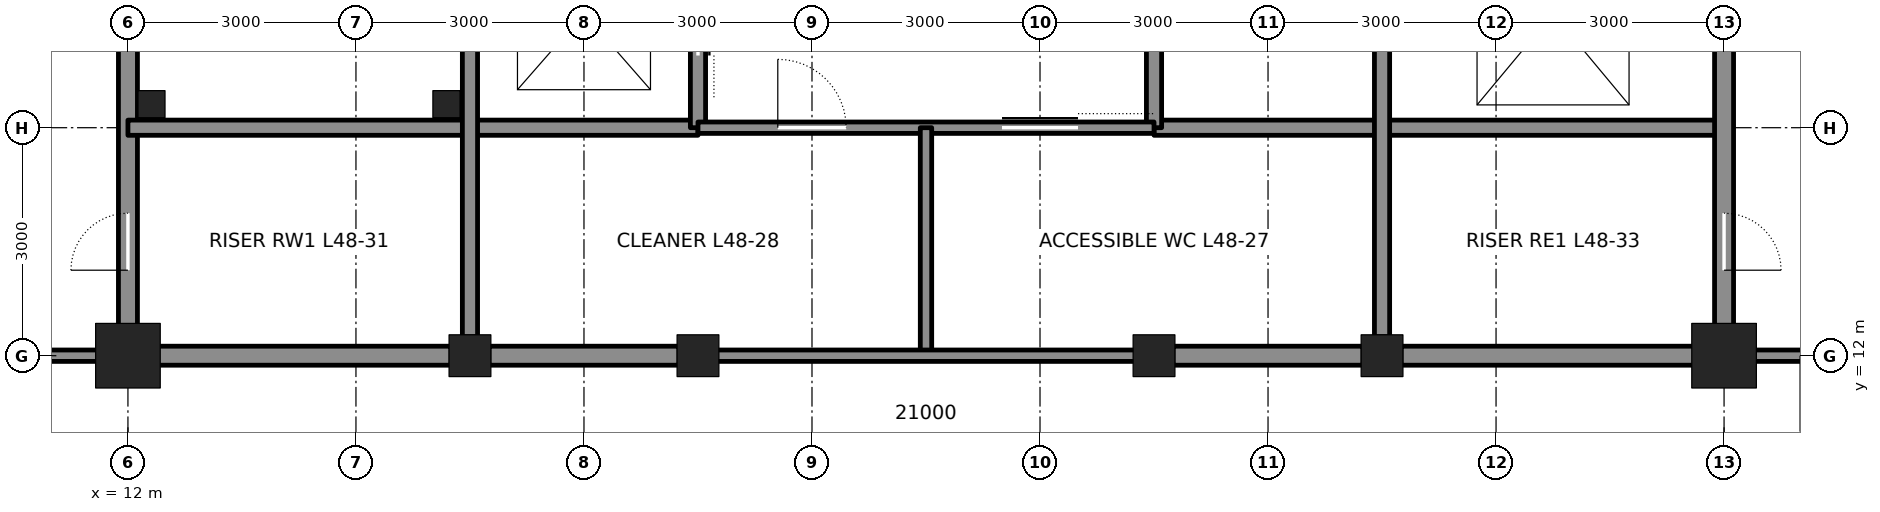
"""IFC4 building model, lengths in metres.
Left out: names, types, materials, properties, quantities, classifications, styles, units other than length and angle.
Written with IfcOpenShell. Run it as: python <this file> out.ifc"""

import sys

from ifc_helpers import new_model, si_unit, direction, frame, frame_2d, origin, origin_2d, place, context, subcontext, project, spatial, rectangle, hollow_rectangle, extrude, element, fill, save


model = new_model("IFC4")
c1 = context("Model", 3, precision=1e-05, world=origin(), true_north=direction((0.0, 1.0)))
c2 = subcontext(c1, "Body", "Model", "MODEL_VIEW")
j1 = project(units=[si_unit("LENGTHUNIT", "METRE"), si_unit("PLANEANGLEUNIT", "RADIAN")], contexts=[c1])
p1 = place(None, origin())
s1 = spatial("IfcSite", under=j1, at=p1, CompositionType="ELEMENT")
p2 = place(p1, origin())
s2 = spatial("IfcBuilding", under=s1, at=p2, CompositionType="ELEMENT")
p3 = place(p2, frame((0.0, 0.0, 218.1)))
s3 = spatial("IfcBuildingStorey", under=s2, at=p3, CompositionType="ELEMENT", Elevation=218.1)
p4 = place(p3, frame((12.0, 12.0, 0.0), z_axis=(0.0, 0.0, 1.0), x_axis=(1.0, 0.0, 0.0)))
e1 = element("IfcColumn", 1, at=p4, inside=s3, PredefinedType="COLUMN", context=c2, shape_type="SweptSolid", body=[
    extrude(hollow_rectangle(XDim=0.85, YDim=0.85, WallThickness=0.085, at=origin_2d()), origin(), (0.0, 0.0, 1.0), 4.2),
])
for number, where, z_axis, x_axis in (
    (2, (16.5, 12.0, 0.0), (0.0, 0.0, 1.0), (1.0, 0.0, 0.0)),
    (3, (19.5, 12.0, 0.0), (0.0, 0.0, 1.0), (1.0, 0.0, 0.0)),
    (4, (25.5, 12.0, 0.0), (0.0, 0.0, 1.0), (1.0, 0.0, 0.0)),
    (5, (28.5, 12.0, 0.0), (0.0, 0.0, 1.0), (1.0, 0.0, 0.0)),
):
    element("IfcColumn", number, at=place(p3, frame(where, z_axis=z_axis, x_axis=x_axis)), inside=s3, PredefinedType="COLUMN", context=c2, shape_type="SweptSolid", body=[
        extrude(hollow_rectangle(XDim=0.55, YDim=0.55, WallThickness=0.045, at=origin_2d()), origin(), (0.0, 0.0, 1.0), 4.2),
    ])
p5 = place(p3, frame((33.0, 12.0, 0.0), z_axis=(0.0, 0.0, 1.0), x_axis=(1.0, 0.0, 0.0)))
e6 = element("IfcColumn", 6, at=p5, inside=s3, PredefinedType="COLUMN", context=c2, shape_type="SweptSolid", body=[
    extrude(hollow_rectangle(XDim=0.85, YDim=0.85, WallThickness=0.085, at=origin_2d()), origin(), (0.0, 0.0, 1.0), 4.2),
])
p6 = place(p3, frame((12.0, 12.25, 0.0), z_axis=(0.0, 0.0, 1.0), x_axis=(0.0, 1.0, 0.0)))
e7 = element("IfcWall", 7, at=p6, inside=s3, PredefinedType="SOLIDWALL", context=c2, shape_type="SweptSolid", body=[
    extrude(rectangle(XDim=8.5, YDim=0.25, at=frame_2d((4.25, 0.0))), origin(), (0.0, 0.0, 1.0), 3.113),
])
p7 = place(p6, frame((0.875, 0.0, 0.0)))
e8 = element("IfcOpeningElement", 8, at=p7, cuts=e7, PredefinedType="OPENING", context=c2, shape_type="SweptSolid", body=[
    extrude(rectangle(XDim=0.75, YDim=2.1, at=frame_2d((0.375, 1.05))), frame((0.0, 0.135, 0.0), z_axis=(0.0, -1.0, 0.0), x_axis=(1.0, 0.0, 0.0)), (0.0, 0.0, 1.0), 0.27),
])
p8 = place(p3, frame((12.25, 12.0, 0.0), z_axis=(0.0, 0.0, 1.0), x_axis=(1.0, 0.0, 0.0)))
e9 = element("IfcWall", 9, at=p8, inside=s3, PredefinedType="SOLIDWALL", context=c2, shape_type="SweptSolid", body=[
    extrude(rectangle(XDim=4.0, YDim=0.25, at=frame_2d((2.0, 0.0))), origin(), (0.0, 0.0, 1.0), 3.181),
])
for number, where, z_axis, x_axis in (
    (10, (16.75, 12.0, 0.0), (0.0, 0.0, 1.0), (1.0, 0.0, 0.0)),
    (11, (25.75, 12.0, 0.0), (0.0, 0.0, 1.0), (1.0, 0.0, 0.0)),
):
    element("IfcWall", number, at=place(p3, frame(where, z_axis=z_axis, x_axis=x_axis)), inside=s3, PredefinedType="SOLIDWALL", context=c2, shape_type="SweptSolid", body=[
        extrude(rectangle(XDim=2.5, YDim=0.25, at=frame_2d((1.25, 0.0))), origin(), (0.0, 0.0, 1.0), 3.181),
    ])
p9 = place(p3, frame((28.75, 12.0, 0.0), z_axis=(0.0, 0.0, 1.0), x_axis=(1.0, 0.0, 0.0)))
e12 = element("IfcWall", 12, at=p9, inside=s3, PredefinedType="SOLIDWALL", context=c2, shape_type="SweptSolid", body=[
    extrude(rectangle(XDim=4.0, YDim=0.25, at=frame_2d((2.0, 0.0))), origin(), (0.0, 0.0, 1.0), 3.181),
])
for number, where, z_axis, x_axis in (
    (13, (12.0, 15.0, 0.0), (0.0, 0.0, 1.0), (1.0, 0.0, 0.0)),
    (14, (25.5, 15.0, 0.0), (0.0, 0.0, 1.0), (1.0, 0.0, 0.0)),
):
    element("IfcWall", number, at=place(p3, frame(where, z_axis=z_axis, x_axis=x_axis)), inside=s3, PredefinedType="SOLIDWALL", context=c2, shape_type="SweptSolid", body=[
        extrude(rectangle(XDim=7.5, YDim=0.2, at=frame_2d((3.75, 0.0))), origin(), (0.0, 0.0, 1.0), 4.04),
    ])
p10 = place(p3, frame((16.5, 12.25, 0.0), z_axis=(0.0, 0.0, 1.0), x_axis=(0.0, 1.0, 0.0)))
e15 = element("IfcWall", 15, at=p10, inside=s3, PredefinedType="SOLIDWALL", context=c2, shape_type="SweptSolid", body=[
    extrude(rectangle(XDim=8.5, YDim=0.2, at=frame_2d((4.25, 0.0))), origin(), (0.0, 0.0, 1.0), 3.113),
])
p11 = place(p3, frame((19.5, 15.0, 0.0), z_axis=(0.0, 0.0, 1.0), x_axis=(0.0, 1.0, 0.0)))
e16 = element("IfcWall", 16, at=p11, inside=s3, PredefinedType="SOLIDWALL", context=c2, shape_type="SweptSolid", body=[
    extrude(rectangle(XDim=12.0, YDim=0.2, at=frame_2d((6.0, 0.0))), origin(), (0.0, 0.0, 1.0), 3.064),
])
p12 = place(p11, frame((0.95, 0.0, 0.0)))
e17 = element("IfcOpeningElement", 17, at=p12, cuts=e16, PredefinedType="OPENING", context=c2, shape_type="SweptSolid", body=[
    extrude(rectangle(XDim=1.1, YDim=2.1, at=frame_2d((0.55, 1.05))), frame((0.0, 0.11, 0.0), z_axis=(0.0, -1.0, 0.0), x_axis=(1.0, 0.0, 0.0)), (0.0, 0.0, 1.0), 0.22),
])
p13 = place(p11, frame((3.95, 0.0, 0.0)))
e18 = element("IfcOpeningElement", 18, at=p13, cuts=e16, PredefinedType="OPENING", context=c2, shape_type="SweptSolid", body=[
    extrude(rectangle(XDim=1.1, YDim=2.1, at=frame_2d((0.55, 1.05))), frame((0.0, 0.11, 0.0), z_axis=(0.0, -1.0, 0.0), x_axis=(1.0, 0.0, 0.0)), (0.0, 0.0, 1.0), 0.22),
])
p14 = place(p11, frame((6.95, 0.0, 0.0)))
e19 = element("IfcOpeningElement", 19, at=p14, cuts=e16, PredefinedType="OPENING", context=c2, shape_type="SweptSolid", body=[
    extrude(rectangle(XDim=1.1, YDim=2.1, at=frame_2d((0.55, 1.05))), frame((0.0, 0.11, 0.0), z_axis=(0.0, -1.0, 0.0), x_axis=(1.0, 0.0, 0.0)), (0.0, 0.0, 1.0), 0.22),
])
p15 = place(p11, frame((9.95, 0.0, 0.0)))
e20 = element("IfcOpeningElement", 20, at=p15, cuts=e16, PredefinedType="OPENING", context=c2, shape_type="SweptSolid", body=[
    extrude(rectangle(XDim=1.1, YDim=2.1, at=frame_2d((0.55, 1.05))), frame((0.0, 0.11, 0.0), z_axis=(0.0, -1.0, 0.0), x_axis=(1.0, 0.0, 0.0)), (0.0, 0.0, 1.0), 0.22),
])
p16 = place(p3, frame((25.5, 15.0, 0.0), z_axis=(0.0, 0.0, 1.0), x_axis=(0.0, 1.0, 0.0)))
e21 = element("IfcWall", 21, at=p16, inside=s3, PredefinedType="SOLIDWALL", context=c2, shape_type="SweptSolid", body=[
    extrude(rectangle(XDim=12.0, YDim=0.2, at=frame_2d((6.0, 0.0))), origin(), (0.0, 0.0, 1.0), 3.064),
])
p17 = place(p3, frame((28.5, 12.25, 0.0), z_axis=(0.0, 0.0, 1.0), x_axis=(0.0, 1.0, 0.0)))
e22 = element("IfcWall", 22, at=p17, inside=s3, PredefinedType="SOLIDWALL", context=c2, shape_type="SweptSolid", body=[
    extrude(rectangle(XDim=8.5, YDim=0.2, at=frame_2d((4.25, 0.0))), origin(), (0.0, 0.0, 1.0), 3.113),
])
p18 = place(p3, frame((33.0, 12.25, 0.0), z_axis=(0.0, 0.0, 1.0), x_axis=(0.0, 1.0, 0.0)))
e23 = element("IfcWall", 23, at=p18, inside=s3, PredefinedType="SOLIDWALL", context=c2, shape_type="SweptSolid", body=[
    extrude(rectangle(XDim=8.5, YDim=0.25, at=frame_2d((4.25, 0.0))), origin(), (0.0, 0.0, 1.0), 3.113),
])
p19 = place(p18, frame((6.65, 0.0, 0.0)))
e24 = element("IfcOpeningElement", 24, at=p19, cuts=e23, PredefinedType="OPENING", context=c2, shape_type="SweptSolid", body=[
    extrude(rectangle(XDim=1.2, YDim=2.1, at=frame_2d((0.6, 1.05))), frame((0.0, 0.135, 0.0), z_axis=(0.0, -1.0, 0.0), x_axis=(1.0, 0.0, 0.0)), (0.0, 0.0, 1.0), 0.27),
])
p20 = place(p18, frame((0.875, 0.0, 0.0)))
e25 = element("IfcOpeningElement", 25, at=p20, cuts=e23, PredefinedType="OPENING", context=c2, shape_type="SweptSolid", body=[
    extrude(rectangle(XDim=0.75, YDim=2.1, at=frame_2d((0.375, 1.05))), frame((0.0, 0.135, 0.0), z_axis=(0.0, -1.0, 0.0), x_axis=(1.0, 0.0, 0.0)), (0.0, 0.0, 1.0), 0.27),
])
p21 = place(p3, frame((19.5, 15.0, 0.0), z_axis=(0.0, 0.0, 1.0), x_axis=(1.0, 0.0, 0.0)))
e26 = element("IfcWall", 26, at=p21, inside=s3, PredefinedType="PARTITIONING", context=c2, shape_type="SweptSolid", body=[
    extrude(rectangle(XDim=6.0, YDim=0.15, at=frame_2d((3.0, 0.0))), origin(), (0.0, 0.0, 1.0), 4.04),
])
p22 = place(p21, frame((4.0, 0.0, 0.0)))
e27 = element("IfcOpeningElement", 27, at=p22, cuts=e26, PredefinedType="OPENING", context=c2, shape_type="SweptSolid", body=[
    extrude(rectangle(XDim=1.0, YDim=2.1, at=frame_2d((0.5, 1.05))), frame((0.0, 0.085, 0.0), z_axis=(0.0, -1.0, 0.0), x_axis=(1.0, 0.0, 0.0)), (0.0, 0.0, 1.0), 0.17),
])
p23 = place(p21, frame((1.05, 0.0, 0.0)))
e28 = element("IfcOpeningElement", 28, at=p23, cuts=e26, PredefinedType="OPENING", context=c2, shape_type="SweptSolid", body=[
    extrude(rectangle(XDim=0.9, YDim=2.1, at=frame_2d((0.45, 1.05))), frame((0.0, 0.085, 0.0), z_axis=(0.0, -1.0, 0.0), x_axis=(1.0, 0.0, 0.0)), (0.0, 0.0, 1.0), 0.17),
])
p24 = place(p3, frame((22.5, 15.0, 0.0), z_axis=(0.0, 0.0, 1.0), x_axis=(0.0, -1.0, 0.0)))
e29 = element("IfcWall", 29, at=p24, inside=s3, PredefinedType="PARTITIONING", context=c2, shape_type="SweptSolid", body=[
    extrude(rectangle(XDim=3.0, YDim=0.15, at=frame_2d((1.5, 0.0))), origin(), (0.0, 0.0, 1.0), 4.04),
])
p25 = place(p3, frame((19.5, 12.0, 0.0), z_axis=(0.0, 0.0, 1.0), x_axis=(1.0, 0.0, 0.0)))
e30 = element("IfcWall", 30, at=p25, inside=s3, PredefinedType="PARTITIONING", context=c2, shape_type="SweptSolid", body=[
    extrude(rectangle(XDim=6.0, YDim=0.15, at=frame_2d((3.0, 0.0))), origin(), (0.0, 0.0, 1.0), 3.181),
])
p26 = place(p3, frame((10.2, 12.0, 0.0), z_axis=(0.0, 0.0, 1.0), x_axis=(1.0, 0.0, 0.0)))
e31 = element("IfcWall", 31, at=p26, inside=s3, PredefinedType="PARTITIONING", context=c2, shape_type="SweptSolid", body=[
    extrude(rectangle(XDim=1.8, YDim=0.15, at=frame_2d((0.9, 0.0))), origin(), (0.0, 0.0, 1.0), 3.27),
])
p27 = place(p3, frame((33.0, 12.0, 0.0), z_axis=(0.0, 0.0, 1.0), x_axis=(1.0, 0.0, 0.0)))
e32 = element("IfcWall", 32, at=p27, inside=s3, PredefinedType="PARTITIONING", context=c2, shape_type="SweptSolid", body=[
    extrude(rectangle(XDim=3.0, YDim=0.15, at=frame_2d((1.5, 0.0))), origin(), (0.0, 0.0, 1.0), 3.27),
])
p28 = place(p27, frame((1.0, 0.0, 0.0)))
e33 = element("IfcOpeningElement", 33, at=p28, cuts=e32, PredefinedType="OPENING", context=c2, shape_type="SweptSolid", body=[
    extrude(rectangle(XDim=1.0, YDim=2.4, at=frame_2d((0.5, 1.2))), frame((0.0, 0.085, 0.0), z_axis=(0.0, -1.0, 0.0), x_axis=(1.0, 0.0, 0.0)), (0.0, 0.0, 1.0), 0.17),
])
for number, where, z_axis, x_axis in (
    (34, (12.31, 15.31, 0.0), (0.0, 0.0, 1.0), (1.0, 0.0, 0.0)),
    (35, (16.19, 15.31, 0.0), (0.0, 0.0, 1.0), (1.0, 0.0, 0.0)),
):
    element("IfcColumn", number, at=place(p3, frame(where, z_axis=z_axis, x_axis=x_axis)), inside=s3, PredefinedType="COLUMN", context=c2, shape_type="SweptSolid", body=[
        extrude(hollow_rectangle(XDim=0.356, YDim=0.356, WallThickness=0.009, at=origin_2d()), origin(), (0.0, 0.0, 1.0), 4.2),
    ])
p29 = place(p7, origin())
e36 = element("IfcDoor", 36, at=p29, inside=s3, OperationType="SINGLE_SWING_LEFT", PredefinedType="DOOR", context=c2, shape_type="SweptSolid", body=[
    extrude(rectangle(XDim=0.75, YDim=2.1, at=frame_2d((0.375, 1.05))), frame((0.0, 0.025, 0.0), z_axis=(0.0, -1.0, 0.0), x_axis=(1.0, 0.0, 0.0)), (0.0, 0.0, 1.0), 0.05),
])
fill(e8, e36)
p30 = place(p20, frame((0.75, 0.0, 0.0), z_axis=(0.0, 0.0, 1.0), x_axis=(-1.0, 0.0, 0.0)))
e37 = element("IfcDoor", 37, at=p30, inside=s3, OperationType="SINGLE_SWING_RIGHT", PredefinedType="DOOR", context=c2, shape_type="SweptSolid", body=[
    extrude(rectangle(XDim=0.75, YDim=2.1, at=frame_2d((0.375, 1.05))), frame((0.0, 0.025, 0.0), z_axis=(0.0, -1.0, 0.0), x_axis=(1.0, 0.0, 0.0)), (0.0, 0.0, 1.0), 0.05),
])
fill(e25, e37)
p31 = place(p22, origin())
e38 = element("IfcDoor", 38, at=p31, inside=s3, OperationType="SLIDING_TO_LEFT", PredefinedType="DOOR", context=c2, shape_type="SweptSolid", body=[
    extrude(rectangle(XDim=1.0, YDim=2.1, at=frame_2d((0.5, 1.05))), frame((0.0, 0.025, 0.0), z_axis=(0.0, -1.0, 0.0), x_axis=(1.0, 0.0, 0.0)), (0.0, 0.0, 1.0), 0.05),
])
fill(e27, e38)
p32 = place(p23, origin())
e39 = element("IfcDoor", 39, at=p32, inside=s3, OperationType="SINGLE_SWING_LEFT", PredefinedType="DOOR", context=c2, shape_type="SweptSolid", body=[
    extrude(rectangle(XDim=0.9, YDim=2.1, at=frame_2d((0.45, 1.05))), frame((0.0, 0.025, 0.0), z_axis=(0.0, -1.0, 0.0), x_axis=(1.0, 0.0, 0.0)), (0.0, 0.0, 1.0), 0.05),
])
fill(e28, e39)
p33 = place(p12, origin())
e40 = element("IfcDoor", 40, at=p33, inside=s3, OperationType="DOUBLE_DOOR_SLIDING", PredefinedType="DOOR", context=c2, shape_type="SweptSolid", body=[
    extrude(rectangle(XDim=1.1, YDim=2.1, at=frame_2d((0.55, 1.05))), frame((0.0, 0.025, 0.0), z_axis=(0.0, -1.0, 0.0), x_axis=(1.0, 0.0, 0.0)), (0.0, 0.0, 1.0), 0.05),
])
fill(e17, e40)
save(model, sys.argv[1])
